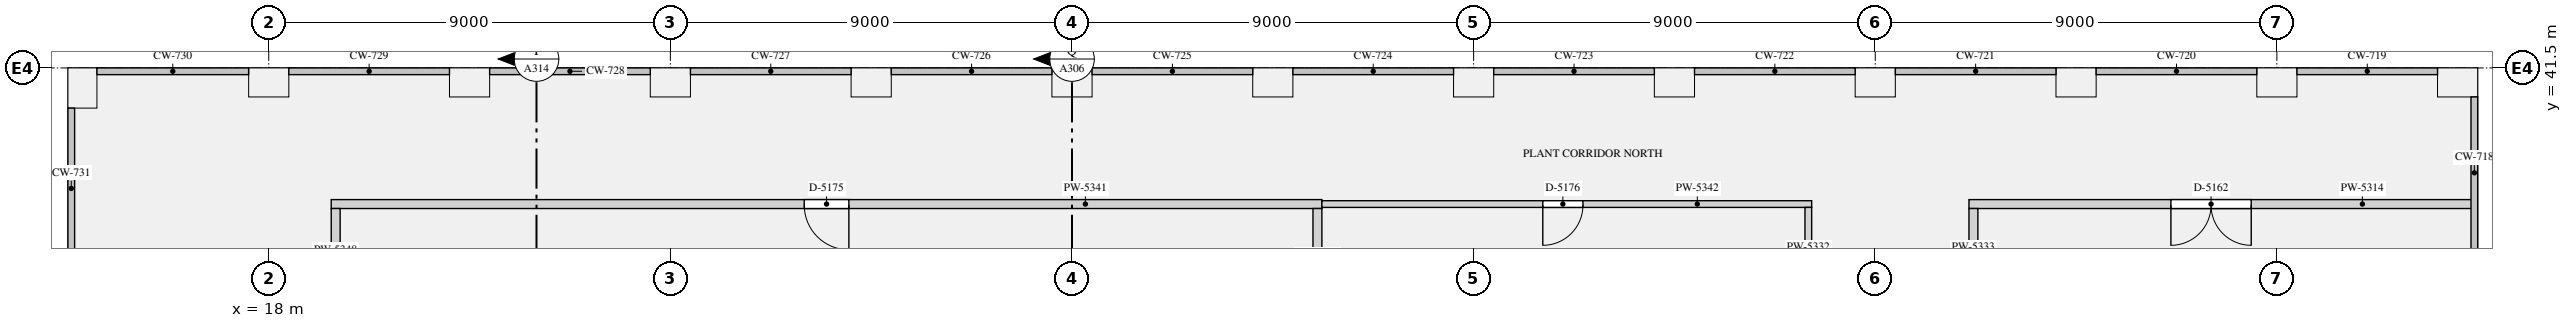
"""IFC4 building model, lengths in metres.
Left out: names, types, materials, properties, quantities, classifications, styles, units other than length and angle.
Written with IfcOpenShell. Run it as: python <this file> out.ifc"""

import sys

from ifc_helpers import new_model, si_unit, direction, frame, frame_2d, origin, origin_2d, place, context, subcontext, project, spatial, rectangle, extrude, element, fill, save


model = new_model("IFC4")
c1 = context("Model", 3, precision=1e-05, world=origin(), true_north=direction((0.0, 1.0)))
c2 = subcontext(c1, "Body", "Model", "MODEL_VIEW")
j1 = project(units=[si_unit("LENGTHUNIT", "METRE"), si_unit("PLANEANGLEUNIT", "RADIAN")], contexts=[c1])
p1 = place(None, origin())
s1 = spatial("IfcSite", under=j1, at=p1, CompositionType="ELEMENT")
p2 = place(p1, origin())
s2 = spatial("IfcBuilding", under=s1, at=p2, CompositionType="ELEMENT")
p3 = place(p2, frame((0.0, 0.0, 240.0)))
s3 = spatial("IfcBuildingStorey", under=s2, at=p3, CompositionType="ELEMENT", Elevation=240.0)
for number, where, z_axis, x_axis in (
    (1, (67.05, 41.175, 0.0), (0.0, 0.0, 1.0), (-1.0, 0.0, 0.0)),
    (2, (63.0, 41.175, 0.0), (0.0, 0.0, 1.0), (-1.0, 0.0, 0.0)),
    (3, (58.5, 41.175, 0.0), (0.0, 0.0, 1.0), (-1.0, 0.0, 0.0)),
    (4, (54.0, 41.175, 0.0), (0.0, 0.0, 1.0), (-1.0, 0.0, 0.0)),
    (5, (49.5, 41.175, 0.0), (0.0, 0.0, 1.0), (-1.0, 0.0, 0.0)),
    (6, (45.0, 41.175, 0.0), (0.0, 0.0, 1.0), (-1.0, 0.0, 0.0)),
    (7, (40.5, 41.175, 0.0), (0.0, 0.0, 1.0), (-1.0, 0.0, 0.0)),
    (8, (36.0, 41.175, 0.0), (0.0, 0.0, 1.0), (-1.0, 0.0, 0.0)),
    (9, (31.5, 41.175, 0.0), (0.0, 0.0, 1.0), (-1.0, 0.0, 0.0)),
    (10, (27.0, 41.175, 0.0), (0.0, 0.0, 1.0), (-1.0, 0.0, 0.0)),
    (11, (22.5, 41.175, 0.0), (0.0, 0.0, 1.0), (-1.0, 0.0, 0.0)),
    (12, (18.0, 41.175, 0.0), (0.0, 0.0, 1.0), (-1.0, 0.0, 0.0)),
    (13, (13.825, 41.05, 0.0), (0.0, 0.0, 1.0), (0.0, -1.0, 0.0)),
):
    element("IfcColumn", number, at=place(p3, frame(where, z_axis=z_axis, x_axis=x_axis)), inside=s3, PredefinedType="USERDEFINED", context=c2, shape_type="SweptSolid", body=[
        extrude(rectangle(XDim=0.9, YDim=0.65, at=origin_2d()), origin(), (0.0, 0.0, 1.0), 4.2),
    ])
p4 = place(p3, frame((19.4, 38.45, 0.0), z_axis=(0.0, 0.0, 1.0), x_axis=(1.0, 0.0, 0.0)))
e14 = element("IfcWall", 14, at=p4, inside=s3, PredefinedType="PARTITIONING", context=c2, shape_type="SweptSolid", body=[
    extrude(rectangle(XDim=22.2, YDim=0.2, at=frame_2d((11.1, 0.0))), origin(), (0.0, 0.0, 1.0), 3.85),
])
p5 = place(p4, frame((10.6, 0.0, 0.0)))
e15 = element("IfcOpeningElement", 15, at=p5, cuts=e14, PredefinedType="OPENING", context=c2, shape_type="SweptSolid", body=[
    extrude(rectangle(XDim=1.0, YDim=2.1, at=frame_2d((0.5, 1.05))), frame((0.0, 0.11, 0.0), z_axis=(0.0, -1.0, 0.0), x_axis=(1.0, 0.0, 0.0)), (0.0, 0.0, 1.0), 0.22),
])
p6 = place(p3, frame((56.1, 38.45, 0.0), z_axis=(0.0, 0.0, 1.0), x_axis=(1.0, 0.0, 0.0)))
e16 = element("IfcWall", 16, at=p6, inside=s3, PredefinedType="PARTITIONING", context=c2, shape_type="SweptSolid", body=[
    extrude(rectangle(XDim=11.307, YDim=0.2, at=frame_2d((5.653, 0.0))), origin(), (0.0, 0.0, 1.0), 3.85),
])
p7 = place(p6, frame((4.525, 0.0, 0.0)))
e17 = element("IfcOpeningElement", 17, at=p7, cuts=e16, PredefinedType="OPENING", context=c2, shape_type="SweptSolid", body=[
    extrude(rectangle(XDim=1.8, YDim=2.1, at=frame_2d((0.9, 1.05))), frame((0.0, 0.11, 0.0), z_axis=(0.0, -1.0, 0.0), x_axis=(1.0, 0.0, 0.0)), (0.0, 0.0, 1.0), 0.22),
])
p8 = place(p3, frame((41.6, 38.45, 0.0), z_axis=(0.0, 0.0, 1.0), x_axis=(1.0, 0.0, 0.0)))
e18 = element("IfcWall", 18, at=p8, inside=s3, PredefinedType="PARTITIONING", context=c2, shape_type="SweptSolid", body=[
    extrude(rectangle(XDim=10.975, YDim=0.15, at=frame_2d((5.487, 0.0))), origin(), (0.0, 0.0, 1.0), 3.85),
])
p9 = place(p8, frame((4.95, 0.0, 0.0)))
e19 = element("IfcOpeningElement", 19, at=p9, cuts=e18, PredefinedType="OPENING", context=c2, shape_type="SweptSolid", body=[
    extrude(rectangle(XDim=0.9, YDim=2.1, at=frame_2d((0.45, 1.05))), frame((0.0, 0.085, 0.0), z_axis=(0.0, -1.0, 0.0), x_axis=(1.0, 0.0, 0.0)), (0.0, 0.0, 1.0), 0.17),
])
p10 = place(p3, frame((19.5, 35.8, 0.0), z_axis=(0.0, 0.0, 1.0), x_axis=(0.0, 1.0, 0.0)))
e20 = element("IfcWall", 20, at=p10, inside=s3, PredefinedType="PARTITIONING", context=c2, shape_type="SweptSolid", body=[
    extrude(rectangle(XDim=2.55, YDim=0.2, at=frame_2d((1.275, 0.0))), origin(), (0.0, 0.0, 1.0), 3.85),
])
p11 = place(p3, frame((41.5, 35.596, 0.0), z_axis=(0.0, 0.0, 1.0), x_axis=(0.0, 1.0, 0.0)))
e21 = element("IfcWall", 21, at=p11, inside=s3, PredefinedType="PARTITIONING", context=c2, shape_type="SweptSolid", body=[
    extrude(rectangle(XDim=2.754, YDim=0.2, at=frame_2d((1.377, 0.0))), origin(), (0.0, 0.0, 1.0), 3.85),
])
p12 = place(p3, frame((52.5, 35.9, 0.0), z_axis=(0.0, 0.0, 1.0), x_axis=(0.0, 1.0, 0.0)))
e22 = element("IfcWall", 22, at=p12, inside=s3, PredefinedType="PARTITIONING", context=c2, shape_type="SweptSolid", body=[
    extrude(rectangle(XDim=2.475, YDim=0.15, at=frame_2d((1.238, 0.0))), origin(), (0.0, 0.0, 1.0), 3.85),
])
p13 = place(p3, frame((56.2, 35.9, 0.0), z_axis=(0.0, 0.0, 1.0), x_axis=(0.0, 1.0, 0.0)))
e23 = element("IfcWall", 23, at=p13, inside=s3, PredefinedType="PARTITIONING", context=c2, shape_type="SweptSolid", body=[
    extrude(rectangle(XDim=2.45, YDim=0.2, at=frame_2d((1.225, 0.0))), origin(), (0.0, 0.0, 1.0), 3.85),
])
p14 = place(p7, frame((1.8, 0.0, 0.0), z_axis=(0.0, 0.0, 1.0), x_axis=(-1.0, 0.0, 0.0)))
e24 = element("IfcDoor", 24, at=p14, inside=s3, OperationType="DOUBLE_DOOR_SINGLE_SWING", PredefinedType="DOOR", context=c2, shape_type="SweptSolid", body=[
    extrude(rectangle(XDim=1.8, YDim=2.1, at=frame_2d((0.9, 1.05))), frame((0.0, 0.025, 0.0), z_axis=(0.0, -1.0, 0.0), x_axis=(1.0, 0.0, 0.0)), (0.0, 0.0, 1.0), 0.05),
])
fill(e17, e24)
p15 = place(p5, frame((1.0, 0.0, 0.0), z_axis=(0.0, 0.0, 1.0), x_axis=(-1.0, 0.0, 0.0)))
e25 = element("IfcDoor", 25, at=p15, inside=s3, OperationType="SINGLE_SWING_LEFT", PredefinedType="DOOR", context=c2, shape_type="SweptSolid", body=[
    extrude(rectangle(XDim=1.0, YDim=2.1, at=frame_2d((0.5, 1.05))), frame((0.0, 0.025, 0.0), z_axis=(0.0, -1.0, 0.0), x_axis=(1.0, 0.0, 0.0)), (0.0, 0.0, 1.0), 0.05),
])
fill(e15, e25)
p16 = place(p9, frame((0.9, 0.0, 0.0), z_axis=(0.0, 0.0, 1.0), x_axis=(-1.0, 0.0, 0.0)))
e26 = element("IfcDoor", 26, at=p16, inside=s3, OperationType="SINGLE_SWING_RIGHT", PredefinedType="DOOR", context=c2, shape_type="SweptSolid", body=[
    extrude(rectangle(XDim=0.9, YDim=2.1, at=frame_2d((0.45, 1.05))), frame((0.0, 0.025, 0.0), z_axis=(0.0, -1.0, 0.0), x_axis=(1.0, 0.0, 0.0)), (0.0, 0.0, 1.0), 0.05),
])
fill(e19, e26)
save(model, sys.argv[1])
